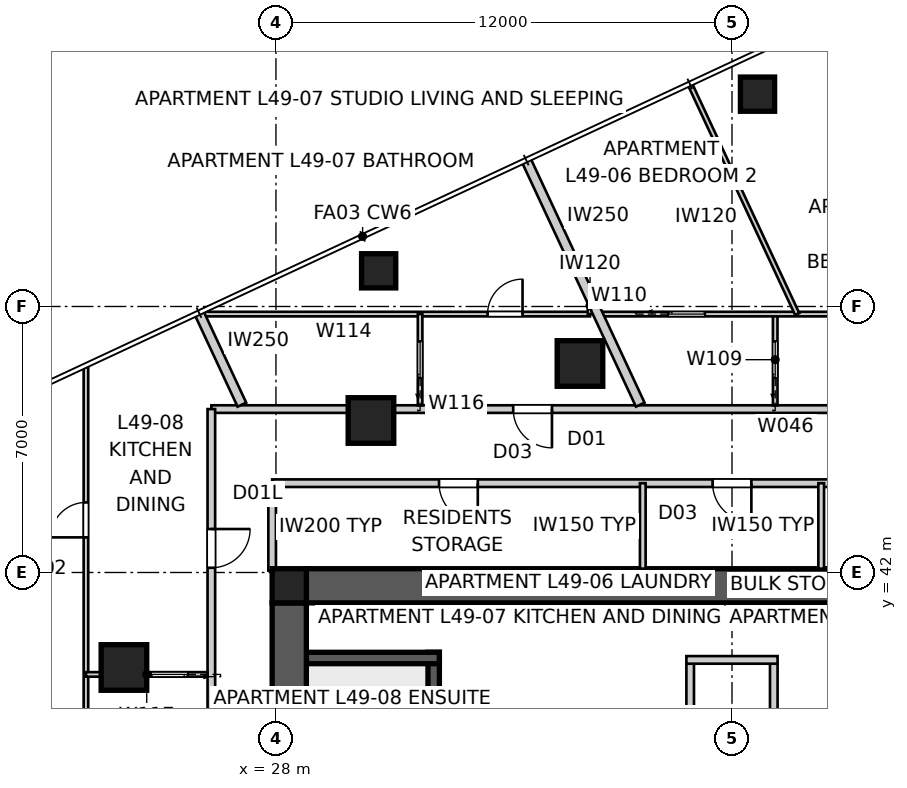
"""IFC4 building model, lengths in metres.
Left out: names, types, materials, properties, quantities, classifications, styles, units other than length and angle.
Written with IfcOpenShell. Run it as: python <this file> out.ifc"""

import sys

from ifc_helpers import new_model, si_unit, direction, frame, frame_2d, origin, origin_2d, place, context, subcontext, project, spatial, polyline, rectangle, outline, extrude, element, fill, save


model = new_model("IFC4")
c1 = context("Model", 3, precision=1e-05, world=origin(), true_north=direction((0.0, 1.0)))
c2 = subcontext(c1, "Body", "Model", "MODEL_VIEW")
j1 = project(units=[si_unit("LENGTHUNIT", "METRE"), si_unit("PLANEANGLEUNIT", "RADIAN")], contexts=[c1])
p1 = place(None, origin())
s1 = spatial("IfcSite", under=j1, at=p1, CompositionType="ELEMENT")
p2 = place(p1, origin())
s2 = spatial("IfcBuilding", under=s1, at=p2, CompositionType="ELEMENT")
p3 = place(p2, frame((0.0, 0.0, 179.4)))
s3 = spatial("IfcBuildingStorey", under=s2, at=p3, CompositionType="ELEMENT", Elevation=179.4)
p4 = place(p3, frame((28.8, 41.65, 0.0), z_axis=(0.0, 0.0, 1.0), x_axis=(1.0, 0.0, 0.0)))
e1 = element("IfcWall", 1, at=p4, inside=s3, PredefinedType="SHEAR", context=c2, shape_type="SweptSolid", body=[
    extrude(outline(polyline([(0.0, -0.45), (22.4, -0.45), (22.4, -0.025), (22.85, -0.025), (22.85, 0.025), (22.4, 0.025), (22.4, 0.45), (0.0, 0.45), (0.0, 0.025), (-0.45, 0.025), (-0.45, -0.025), (0.0, -0.025), (0.0, -0.45)])), origin(), (0.0, 0.0, 1.0), 3.4),
])
p5 = place(p3, frame((28.35, 41.2, 0.0), z_axis=(0.0, 0.0, 1.0), x_axis=(0.0, -1.0, 0.0)))
e2 = element("IfcWall", 2, at=p5, inside=s3, PredefinedType="SHEAR", context=c2, shape_type="SweptSolid", body=[
    extrude(outline(polyline([(0.0, -0.45), (22.4, -0.45), (22.4, -0.025), (22.85, -0.025), (22.85, 0.025), (22.4, 0.025), (22.4, 0.45), (0.0, 0.45), (0.0, 0.025), (-0.45, 0.025), (-0.45, -0.025), (0.0, -0.025), (0.0, -0.45)])), origin(), (0.0, 0.0, 1.0), 3.4),
])
p6 = place(p5, frame((11.14, 0.0, 0.0)))
e3 = element("IfcOpeningElement", 3, at=p6, cuts=e2, PredefinedType="OPENING", context=c2, shape_type="SweptSolid", body=[
    extrude(rectangle(XDim=1.02, YDim=2.4, at=frame_2d((0.51, 1.2))), frame((0.0, 0.46, 0.0), z_axis=(0.0, -1.0, 0.0), x_axis=(1.0, 0.0, 0.0)), (0.0, 0.0, 1.0), 0.92),
])
p7 = place(p3, frame((32.15, 32.2, 0.0), z_axis=(0.0, 0.0, 1.0), x_axis=(0.0, 1.0, 0.0)))
e4 = element("IfcWall", 4, at=p7, inside=s3, PredefinedType="SHEAR", context=c2, shape_type="SweptSolid", body=[
    extrude(rectangle(XDim=7.7, YDim=0.3, at=frame_2d((3.85, 0.0))), origin(), (0.0, 0.0, 1.0), 3.4),
])
p8 = place(p3, frame((28.8, 39.75, 0.0), z_axis=(0.0, 0.0, 1.0), x_axis=(1.0, 0.0, 0.0)))
e5 = element("IfcWall", 5, at=p8, inside=s3, PredefinedType="SHEAR", context=c2, shape_type="SweptSolid", body=[
    extrude(rectangle(XDim=3.5, YDim=0.3, at=frame_2d((1.75, 0.0))), origin(), (0.0, 0.0, 1.0), 3.4),
])
for number, where, z_axis, x_axis in (
    (6, (38.9, 37.6, 0.0), (0.0, 0.0, 1.0), (0.0, 1.0, 0.0)),
    (7, (41.1, 37.6, 0.0), (0.0, 0.0, 1.0), (0.0, 1.0, 0.0)),
):
    element("IfcWall", number, at=place(p3, frame(where, z_axis=z_axis, x_axis=x_axis)), inside=s3, PredefinedType="SOLIDWALL", context=c2, shape_type="SweptSolid", body=[
        extrude(rectangle(XDim=2.0, YDim=0.2, at=frame_2d((1.0, 0.0))), origin(), (0.0, 0.0, 1.0), 3.4),
    ])
p9 = place(p3, frame((38.8, 39.7, 0.0), z_axis=(0.0, 0.0, 1.0), x_axis=(1.0, 0.0, 0.0)))
e8 = element("IfcWall", 8, at=p9, inside=s3, PredefinedType="SOLIDWALL", context=c2, shape_type="SweptSolid", body=[
    extrude(rectangle(XDim=2.4, YDim=0.2, at=frame_2d((1.2, 0.0))), origin(), (0.0, 0.0, 1.0), 3.4),
])
for number, where, z_axis, x_axis in (
    (9, (28.35, 41.65, 0.0), (0.0, 0.0, 1.0), (1.0, 0.0, 0.0)),
    (10, (40.672, 54.588, 0.0), (0.0, 0.0, 1.0), (1.0, 0.0, 0.0)),
    (11, (30.702, 49.939, 0.0), (0.0, 0.0, 1.0), (1.0, 0.0, 0.0)),
):
    element("IfcColumn", number, at=place(p3, frame(where, z_axis=z_axis, x_axis=x_axis)), inside=s3, PredefinedType="COLUMN", context=c2, shape_type="SweptSolid", body=[
        extrude(rectangle(XDim=0.9, YDim=0.9, at=origin_2d()), origin(), (0.0, 0.0, 1.0), 3.4),
    ])
for number, where, z_axis, x_axis in (
    (12, (36.0, 47.5, 0.0), (0.0, 0.0, 1.0), (1.0, 0.0, 0.0)),
    (13, (30.5, 46.0, 0.0), (0.0, 0.0, 1.0), (1.0, 0.0, 0.0)),
    (14, (24.0, 39.5, 0.0), (0.0, 0.0, 1.0), (1.0, 0.0, 0.0)),
):
    element("IfcColumn", number, at=place(p3, frame(where, z_axis=z_axis, x_axis=x_axis)), inside=s3, PredefinedType="COLUMN", context=c2, shape_type="SweptSolid", body=[
        extrude(rectangle(XDim=1.2, YDim=1.2, at=origin_2d()), origin(), (0.0, 0.0, 1.0), 3.4),
    ])
p10 = place(p3, frame((47.558, 46.3, 0.0), z_axis=(0.0, 0.0, 1.0), x_axis=(-1.0, 0.0, 0.0)))
e15 = element("IfcWall", 15, at=p10, inside=s3, PredefinedType="PARTITIONING", context=c2, shape_type="SweptSolid", body=[
    extrude(rectangle(XDim=15.117, YDim=0.2, at=frame_2d((7.558, 0.0))), origin(), (0.0, 0.0, 1.0), 3.25),
])
p11 = place(p10, frame((12.295, 0.0, 0.0)))
e16 = element("IfcOpeningElement", 16, at=p11, cuts=e15, PredefinedType="OPENING", context=c2, shape_type="SweptSolid", body=[
    extrude(rectangle(XDim=1.02, YDim=2.34, at=frame_2d((0.51, 1.17))), frame((0.0, 0.11, 0.0), z_axis=(0.0, -1.0, 0.0), x_axis=(1.0, 0.0, 0.0)), (0.0, 0.0, 1.0), 0.22),
])
p12 = place(p3, frame((32.442, 46.3, 0.0), z_axis=(0.0, 0.0, 1.0), x_axis=(-1.0, 0.0, 0.0)))
e17 = element("IfcWall", 17, at=p12, inside=s3, PredefinedType="PARTITIONING", context=c2, shape_type="SweptSolid", body=[
    extrude(rectangle(XDim=1.683, YDim=0.2, at=frame_2d((0.842, 0.0))), origin(), (0.0, 0.0, 1.0), 2.55),
])
p13 = place(p3, frame((30.758, 46.3, 0.0), z_axis=(0.0, 0.0, 1.0), x_axis=(-1.0, 0.0, 0.0)))
e18 = element("IfcWall", 18, at=p13, inside=s3, PredefinedType="PARTITIONING", context=c2, shape_type="SweptSolid", body=[
    extrude(rectangle(XDim=4.458, YDim=0.2, at=frame_2d((2.229, 0.0))), origin(), (0.0, 0.0, 1.0), 3.25),
])
p14 = place(p3, frame((26.3, 46.3, 0.0), z_axis=(0.0, 0.0, 1.0), x_axis=(0.0, -1.0, 0.0)))
e19 = element("IfcWall", 19, at=p14, inside=s3, PredefinedType="PARTITIONING", context=c2, shape_type="SweptSolid", body=[
    extrude(rectangle(XDim=32.6, YDim=0.2, at=frame_2d((16.3, 0.0))), origin(), (0.0, 0.0, 1.0), 3.25),
])
p15 = place(p14, frame((3.156, 0.0, 0.0)))
e20 = element("IfcOpeningElement", 20, at=p15, cuts=e19, PredefinedType="OPENING", context=c2, shape_type="SweptSolid", body=[
    extrude(rectangle(XDim=1.02, YDim=2.1, at=frame_2d((0.51, 1.05))), frame((0.0, 0.11, 0.0), z_axis=(0.0, -1.0, 0.0), x_axis=(1.0, 0.0, 0.0)), (0.0, 0.0, 1.0), 0.22),
])
p16 = place(p14, frame((14.68, 0.0, 0.0)))
e21 = element("IfcOpeningElement", 21, at=p16, cuts=e19, PredefinedType="OPENING", context=c2, shape_type="SweptSolid", body=[
    extrude(rectangle(XDim=1.02, YDim=2.34, at=frame_2d((0.51, 1.17))), frame((0.0, 0.11, 0.0), z_axis=(0.0, -1.0, 0.0), x_axis=(1.0, 0.0, 0.0)), (0.0, 0.0, 1.0), 0.22),
])
p17 = place(p14, frame((29.543, 0.0, 0.0)))
e22 = element("IfcOpeningElement", 22, at=p17, cuts=e19, PredefinedType="OPENING", context=c2, shape_type="SweptSolid", body=[
    extrude(rectangle(XDim=1.02, YDim=2.34, at=frame_2d((0.51, 1.17))), frame((0.0, 0.11, 0.0), z_axis=(0.0, -1.0, 0.0), x_axis=(1.0, 0.0, 0.0)), (0.0, 0.0, 1.0), 0.22),
])
p18 = place(p3, frame((34.585, 52.853, 0.0), z_axis=(0.0, 0.0, 1.0), x_axis=(0.422623839356, -0.906305186131, 0.0)))
e23 = element("IfcWall", 23, at=p18, inside=s3, PredefinedType="PARTITIONING", context=c2, shape_type="SweptSolid", body=[
    extrude(rectangle(XDim=7.101, YDim=0.25, at=frame_2d((3.551, 0.0))), origin(), (0.0, 0.0, 1.0), 3.25),
])
p19 = place(p3, frame((25.975, 48.838, 0.0), z_axis=(0.0, 0.0, 1.0), x_axis=(0.422590257842, -0.906320844943, 0.0)))
e24 = element("IfcWall", 24, at=p19, inside=s3, PredefinedType="PARTITIONING", context=c2, shape_type="SweptSolid", body=[
    extrude(rectangle(XDim=2.671, YDim=0.25, at=frame_2d((1.336, 0.0))), origin(), (0.0, 0.0, 1.0), 3.25),
])
p20 = place(p3, frame((52.1, 44.35, 0.0), z_axis=(0.0, 0.0, 1.0), x_axis=(-1.0, 0.0, 0.0)))
e25 = element("IfcWall", 25, at=p20, inside=s3, PredefinedType="PARTITIONING", context=c2, shape_type="SweptSolid", body=[
    extrude(rectangle(XDim=24.2, YDim=0.2, at=frame_2d((12.1, 0.0))), origin(), (0.0, 0.0, 1.0), 3.25),
])
p21 = place(p20, frame((18.789, 0.0, 0.0)))
e26 = element("IfcOpeningElement", 26, at=p21, cuts=e25, PredefinedType="OPENING", context=c2, shape_type="SweptSolid", body=[
    extrude(rectangle(XDim=1.02, YDim=2.1, at=frame_2d((0.51, 1.05))), frame((0.0, 0.11, 0.0), z_axis=(0.0, -1.0, 0.0), x_axis=(1.0, 0.0, 0.0)), (0.0, 0.0, 1.0), 0.22),
])
p22 = place(p20, frame((4.391, 0.0, 0.0)))
e27 = element("IfcOpeningElement", 27, at=p22, cuts=e25, PredefinedType="OPENING", context=c2, shape_type="SweptSolid", body=[
    extrude(rectangle(XDim=1.02, YDim=2.1, at=frame_2d((0.51, 1.05))), frame((0.0, 0.11, 0.0), z_axis=(0.0, -1.0, 0.0), x_axis=(1.0, 0.0, 0.0)), (0.0, 0.0, 1.0), 0.22),
])
p23 = place(p20, frame((11.59, 0.0, 0.0)))
e28 = element("IfcOpeningElement", 28, at=p23, cuts=e25, PredefinedType="OPENING", context=c2, shape_type="SweptSolid", body=[
    extrude(rectangle(XDim=1.02, YDim=2.1, at=frame_2d((0.51, 1.05))), frame((0.0, 0.11, 0.0), z_axis=(0.0, -1.0, 0.0), x_axis=(1.0, 0.0, 0.0)), (0.0, 0.0, 1.0), 0.22),
])
p24 = place(p3, frame((27.9, 44.35, 0.0), z_axis=(0.0, 0.0, 1.0), x_axis=(0.0, -1.0, 0.0)))
e29 = element("IfcWall", 29, at=p24, inside=s3, PredefinedType="PARTITIONING", context=c2, shape_type="SweptSolid", body=[
    extrude(rectangle(XDim=2.3, YDim=0.2, at=frame_2d((1.15, 0.0))), origin(), (0.0, 0.0, 1.0), 3.25),
])
for number, where, z_axis, x_axis in (
    (30, (37.653, 42.1, 0.0), (0.0, 0.0, 1.0), (0.0, 1.0, 0.0)),
    (31, (42.347, 42.1, 0.0), (0.0, 0.0, 1.0), (0.0, 1.0, 0.0)),
):
    element("IfcWall", number, at=place(p3, frame(where, z_axis=z_axis, x_axis=x_axis)), inside=s3, PredefinedType="SOLIDWALL", context=c2, shape_type="SweptSolid", body=[
        extrude(rectangle(XDim=2.25, YDim=0.15, at=frame_2d((1.125, 0.0))), origin(), (0.0, 0.0, 1.0), 3.25),
    ])
p25 = place(p3, frame((23.0, 16.832, 0.0), z_axis=(0.0, 0.0, 1.0), x_axis=(0.0, 1.0, 0.0)))
e32 = element("IfcWall", 32, at=p25, inside=s3, PredefinedType="PARTITIONING", context=c2, shape_type="SweptSolid", body=[
    extrude(rectangle(XDim=30.574, YDim=0.12, at=frame_2d((15.287, 0.0))), origin(), (0.0, 0.0, 1.0), 2.55),
])
p26 = place(p25, frame((26.093, 0.0, 0.0)))
e33 = element("IfcOpeningElement", 33, at=p26, cuts=e32, PredefinedType="OPENING", context=c2, shape_type="SweptSolid", body=[
    extrude(rectangle(XDim=0.92, YDim=2.34, at=frame_2d((0.46, 1.17))), frame((0.0, 0.07, 0.0), z_axis=(0.0, -1.0, 0.0), x_axis=(1.0, 0.0, 0.0)), (0.0, 0.0, 1.0), 0.14),
])
p27 = place(p25, frame((13.012, 0.0, 0.0)))
e34 = element("IfcOpeningElement", 34, at=p27, cuts=e32, PredefinedType="OPENING", context=c2, shape_type="SweptSolid", body=[
    extrude(rectangle(XDim=0.92, YDim=2.34, at=frame_2d((0.46, 1.17))), frame((0.0, 0.07, 0.0), z_axis=(0.0, -1.0, 0.0), x_axis=(1.0, 0.0, 0.0)), (0.0, 0.0, 1.0), 0.14),
])
p28 = place(p25, frame((19.16, 0.0, 0.0)))
e35 = element("IfcOpeningElement", 35, at=p28, cuts=e32, PredefinedType="OPENING", context=c2, shape_type="SweptSolid", body=[
    extrude(rectangle(XDim=0.96, YDim=2.1, at=frame_2d((0.48, 1.05))), frame((0.0, 0.07, 0.0), z_axis=(0.0, -1.0, 0.0), x_axis=(1.0, 0.0, 0.0)), (0.0, 0.0, 1.0), 0.14),
])
p29 = place(p25, frame((2.018, 0.0, 0.0)))
e36 = element("IfcOpeningElement", 36, at=p29, cuts=e32, PredefinedType="OPENING", context=c2, shape_type="SweptSolid", body=[
    extrude(rectangle(XDim=0.96, YDim=2.1, at=frame_2d((0.48, 1.05))), frame((0.0, 0.07, 0.0), z_axis=(0.0, -1.0, 0.0), x_axis=(1.0, 0.0, 0.0)), (0.0, 0.0, 1.0), 0.14),
])
p30 = place(p3, frame((41.137, 46.4, 0.0), z_axis=(0.0, 0.0, 1.0), x_axis=(0.0, 1.0, 0.0)))
e37 = element("IfcWall", 37, at=p30, inside=s3, PredefinedType="PARTITIONING", context=c2, shape_type="SweptSolid", body=[
    extrude(rectangle(XDim=2.4, YDim=0.12, at=frame_2d((1.2, 0.0))), origin(), (0.0, 0.0, 1.0), 3.25),
])
p31 = place(p30, frame((0.72, 0.0, 0.0)))
e38 = element("IfcOpeningElement", 38, at=p31, cuts=e37, PredefinedType="OPENING", context=c2, shape_type="SweptSolid", body=[
    extrude(rectangle(XDim=0.96, YDim=2.1, at=frame_2d((0.48, 1.05))), frame((0.0, 0.07, 0.0), z_axis=(0.0, -1.0, 0.0), x_axis=(1.0, 0.0, 0.0)), (0.0, 0.0, 1.0), 0.14),
])
p32 = place(p3, frame((36.475, 48.8, 0.0), z_axis=(0.0, 0.0, 1.0), x_axis=(1.0, 0.0, 0.0)))
e39 = element("IfcWall", 39, at=p32, inside=s3, PredefinedType="PARTITIONING", context=c2, shape_type="SweptSolid", body=[
    extrude(rectangle(XDim=10.242, YDim=0.12, at=frame_2d((5.121, 0.0))), origin(), (0.0, 0.0, 1.0), 3.25),
])
p33 = place(p32, frame((8.284, 0.0, 0.0)))
e40 = element("IfcOpeningElement", 40, at=p33, cuts=e39, PredefinedType="OPENING", context=c2, shape_type="SweptSolid", body=[
    extrude(rectangle(XDim=0.96, YDim=2.1, at=frame_2d((0.48, 1.05))), frame((0.0, 0.07, 0.0), z_axis=(0.0, -1.0, 0.0), x_axis=(1.0, 0.0, 0.0)), (0.0, 0.0, 1.0), 0.14),
])
p34 = place(p32, frame((1.851, 0.0, 0.0)))
e41 = element("IfcOpeningElement", 41, at=p34, cuts=e39, PredefinedType="OPENING", context=c2, shape_type="SweptSolid", body=[
    extrude(rectangle(XDim=0.96, YDim=2.1, at=frame_2d((0.48, 1.05))), frame((0.0, 0.07, 0.0), z_axis=(0.0, -1.0, 0.0), x_axis=(1.0, 0.0, 0.0)), (0.0, 0.0, 1.0), 0.14),
])
p35 = place(p3, frame((41.716, 48.8, 0.0), z_axis=(0.0, 0.0, 1.0), x_axis=(-0.422642131948, 0.906296655793, 0.0)))
e42 = element("IfcWall", 42, at=p35, inside=s3, PredefinedType="PARTITIONING", context=c2, shape_type="SweptSolid", body=[
    extrude(rectangle(XDim=6.646, YDim=0.12, at=frame_2d((3.323, 0.0))), origin(), (0.0, 0.0, 1.0), 3.25),
])
p36 = place(p3, frame((25.993, 48.8, 0.0), z_axis=(0.0, 0.0, 1.0), x_axis=(1.0, 0.0, 0.0)))
e43 = element("IfcWall", 43, at=p36, inside=s3, PredefinedType="PARTITIONING", context=c2, shape_type="SweptSolid", body=[
    extrude(rectangle(XDim=10.272, YDim=0.12, at=frame_2d((5.136, 0.0))), origin(), (0.0, 0.0, 1.0), 3.25),
])
p37 = place(p36, frame((7.576, 0.0, 0.0)))
e44 = element("IfcOpeningElement", 44, at=p37, cuts=e43, PredefinedType="OPENING", context=c2, shape_type="SweptSolid", body=[
    extrude(rectangle(XDim=0.92, YDim=2.34, at=frame_2d((0.46, 1.17))), frame((0.0, 0.07, 0.0), z_axis=(0.0, -1.0, 0.0), x_axis=(1.0, 0.0, 0.0)), (0.0, 0.0, 1.0), 0.14),
])
p38 = place(p3, frame((36.265, 48.8, 0.0), z_axis=(0.0, 0.0, 1.0), x_axis=(0.0, 1.0, 0.0)))
e45 = element("IfcWall", 45, at=p38, inside=s3, PredefinedType="PARTITIONING", context=c2, shape_type="SweptSolid", body=[
    extrude(rectangle(XDim=0.45, YDim=0.12, at=frame_2d((0.225, 0.0))), origin(), (0.0, 0.0, 1.0), 3.25),
])
p39 = place(p3, frame((31.793, 46.4, 0.0), z_axis=(0.0, 0.0, 1.0), x_axis=(0.0, 1.0, 0.0)))
e46 = element("IfcWall", 46, at=p39, inside=s3, PredefinedType="PARTITIONING", context=c2, shape_type="SweptSolid", body=[
    extrude(rectangle(XDim=2.4, YDim=0.12, at=frame_2d((1.2, 0.0))), origin(), (0.0, 0.0, 1.0), 3.25),
])
p40 = place(p39, frame((0.72, 0.0, 0.0)))
e47 = element("IfcOpeningElement", 47, at=p40, cuts=e46, PredefinedType="OPENING", context=c2, shape_type="SweptSolid", body=[
    extrude(rectangle(XDim=0.96, YDim=2.1, at=frame_2d((0.48, 1.05))), frame((0.0, 0.07, 0.0), z_axis=(0.0, -1.0, 0.0), x_axis=(1.0, 0.0, 0.0)), (0.0, 0.0, 1.0), 0.14),
])
p41 = place(p3, frame((26.2, 39.318, 0.0), z_axis=(0.0, 0.0, 1.0), x_axis=(-1.0, 0.0, 0.0)))
e48 = element("IfcWall", 48, at=p41, inside=s3, PredefinedType="PARTITIONING", context=c2, shape_type="SweptSolid", body=[
    extrude(rectangle(XDim=3.2, YDim=0.12, at=frame_2d((1.6, 0.0))), origin(), (0.0, 0.0, 1.0), 3.25),
])
p42 = place(p41, frame((0.52, 0.0, 0.0)))
e49 = element("IfcOpeningElement", 49, at=p42, cuts=e48, PredefinedType="OPENING", context=c2, shape_type="SweptSolid", body=[
    extrude(rectangle(XDim=0.96, YDim=2.1, at=frame_2d((0.48, 1.05))), frame((0.0, 0.07, 0.0), z_axis=(0.0, -1.0, 0.0), x_axis=(1.0, 0.0, 0.0)), (0.0, 0.0, 1.0), 0.14),
])
p43 = place(p21, origin())
e50 = element("IfcDoor", 50, at=p43, inside=s3, OperationType="SINGLE_SWING_LEFT", PredefinedType="DOOR", context=c2, shape_type="SweptSolid", body=[
    extrude(rectangle(XDim=1.02, YDim=2.1, at=frame_2d((0.51, 1.05))), frame((0.0, 0.025, 0.0), z_axis=(0.0, -1.0, 0.0), x_axis=(1.0, 0.0, 0.0)), (0.0, 0.0, 1.0), 0.05),
])
fill(e26, e50)
p44 = place(p15, origin())
e51 = element("IfcDoor", 51, at=p44, inside=s3, OperationType="SINGLE_SWING_LEFT", PredefinedType="DOOR", context=c2, shape_type="SweptSolid", body=[
    extrude(rectangle(XDim=1.02, YDim=2.1, at=frame_2d((0.51, 1.05))), frame((0.0, 0.025, 0.0), z_axis=(0.0, -1.0, 0.0), x_axis=(1.0, 0.0, 0.0)), (0.0, 0.0, 1.0), 0.05),
])
fill(e20, e51)
p45 = place(p11, origin())
e52 = element("IfcDoor", 52, at=p45, inside=s3, OperationType="SINGLE_SWING_LEFT", PredefinedType="DOOR", context=c2, shape_type="SweptSolid", body=[
    extrude(rectangle(XDim=1.02, YDim=2.34, at=frame_2d((0.51, 1.17))), frame((0.0, 0.025, 0.0), z_axis=(0.0, -1.0, 0.0), x_axis=(1.0, 0.0, 0.0)), (0.0, 0.0, 1.0), 0.05),
])
fill(e16, e52)
p46 = place(p23, origin())
e53 = element("IfcDoor", 53, at=p46, inside=s3, OperationType="SINGLE_SWING_LEFT", PredefinedType="DOOR", context=c2, shape_type="SweptSolid", body=[
    extrude(rectangle(XDim=1.02, YDim=2.1, at=frame_2d((0.51, 1.05))), frame((0.0, 0.025, 0.0), z_axis=(0.0, -1.0, 0.0), x_axis=(1.0, 0.0, 0.0)), (0.0, 0.0, 1.0), 0.05),
])
fill(e28, e53)
p47 = place(p26, origin())
e54 = element("IfcDoor", 54, at=p47, inside=s3, OperationType="SINGLE_SWING_LEFT", PredefinedType="DOOR", context=c2, shape_type="SweptSolid", body=[
    extrude(rectangle(XDim=0.92, YDim=2.34, at=frame_2d((0.46, 1.17))), frame((0.0, 0.025, 0.0), z_axis=(0.0, -1.0, 0.0), x_axis=(1.0, 0.0, 0.0)), (0.0, 0.0, 1.0), 0.05),
])
fill(e33, e54)
p48 = place(p42, origin())
e55 = element("IfcDoor", 55, at=p48, inside=s3, OperationType="SLIDING_TO_LEFT", PredefinedType="DOOR", context=c2, shape_type="SweptSolid", body=[
    extrude(rectangle(XDim=0.96, YDim=2.1, at=frame_2d((0.48, 1.05))), frame((0.0, 0.025, 0.0), z_axis=(0.0, -1.0, 0.0), x_axis=(1.0, 0.0, 0.0)), (0.0, 0.0, 1.0), 0.05),
])
fill(e49, e55)
p49 = place(p37, origin())
e56 = element("IfcDoor", 56, at=p49, inside=s3, OperationType="SINGLE_SWING_RIGHT", PredefinedType="DOOR", context=c2, shape_type="SweptSolid", body=[
    extrude(rectangle(XDim=0.92, YDim=2.34, at=frame_2d((0.46, 1.17))), frame((0.0, 0.025, 0.0), z_axis=(0.0, -1.0, 0.0), x_axis=(1.0, 0.0, 0.0)), (0.0, 0.0, 1.0), 0.05),
])
fill(e44, e56)
p50 = place(p40, origin())
e57 = element("IfcDoor", 57, at=p50, inside=s3, OperationType="SLIDING_TO_LEFT", PredefinedType="DOOR", context=c2, shape_type="SweptSolid", body=[
    extrude(rectangle(XDim=0.96, YDim=2.1, at=frame_2d((0.48, 1.05))), frame((0.0, 0.025, 0.0), z_axis=(0.0, -1.0, 0.0), x_axis=(1.0, 0.0, 0.0)), (0.0, 0.0, 1.0), 0.05),
])
fill(e47, e57)
p51 = place(p31, origin())
e58 = element("IfcDoor", 58, at=p51, inside=s3, OperationType="SLIDING_TO_LEFT", PredefinedType="DOOR", context=c2, shape_type="SweptSolid", body=[
    extrude(rectangle(XDim=0.96, YDim=2.1, at=frame_2d((0.48, 1.05))), frame((0.0, 0.025, 0.0), z_axis=(0.0, -1.0, 0.0), x_axis=(1.0, 0.0, 0.0)), (0.0, 0.0, 1.0), 0.05),
])
fill(e38, e58)
p52 = place(p34, origin())
e59 = element("IfcDoor", 59, at=p52, inside=s3, OperationType="SLIDING_TO_LEFT", PredefinedType="DOOR", context=c2, shape_type="SweptSolid", body=[
    extrude(rectangle(XDim=0.96, YDim=2.1, at=frame_2d((0.48, 1.05))), frame((0.0, 0.025, 0.0), z_axis=(0.0, -1.0, 0.0), x_axis=(1.0, 0.0, 0.0)), (0.0, 0.0, 1.0), 0.05),
])
fill(e41, e59)
save(model, sys.argv[1])
